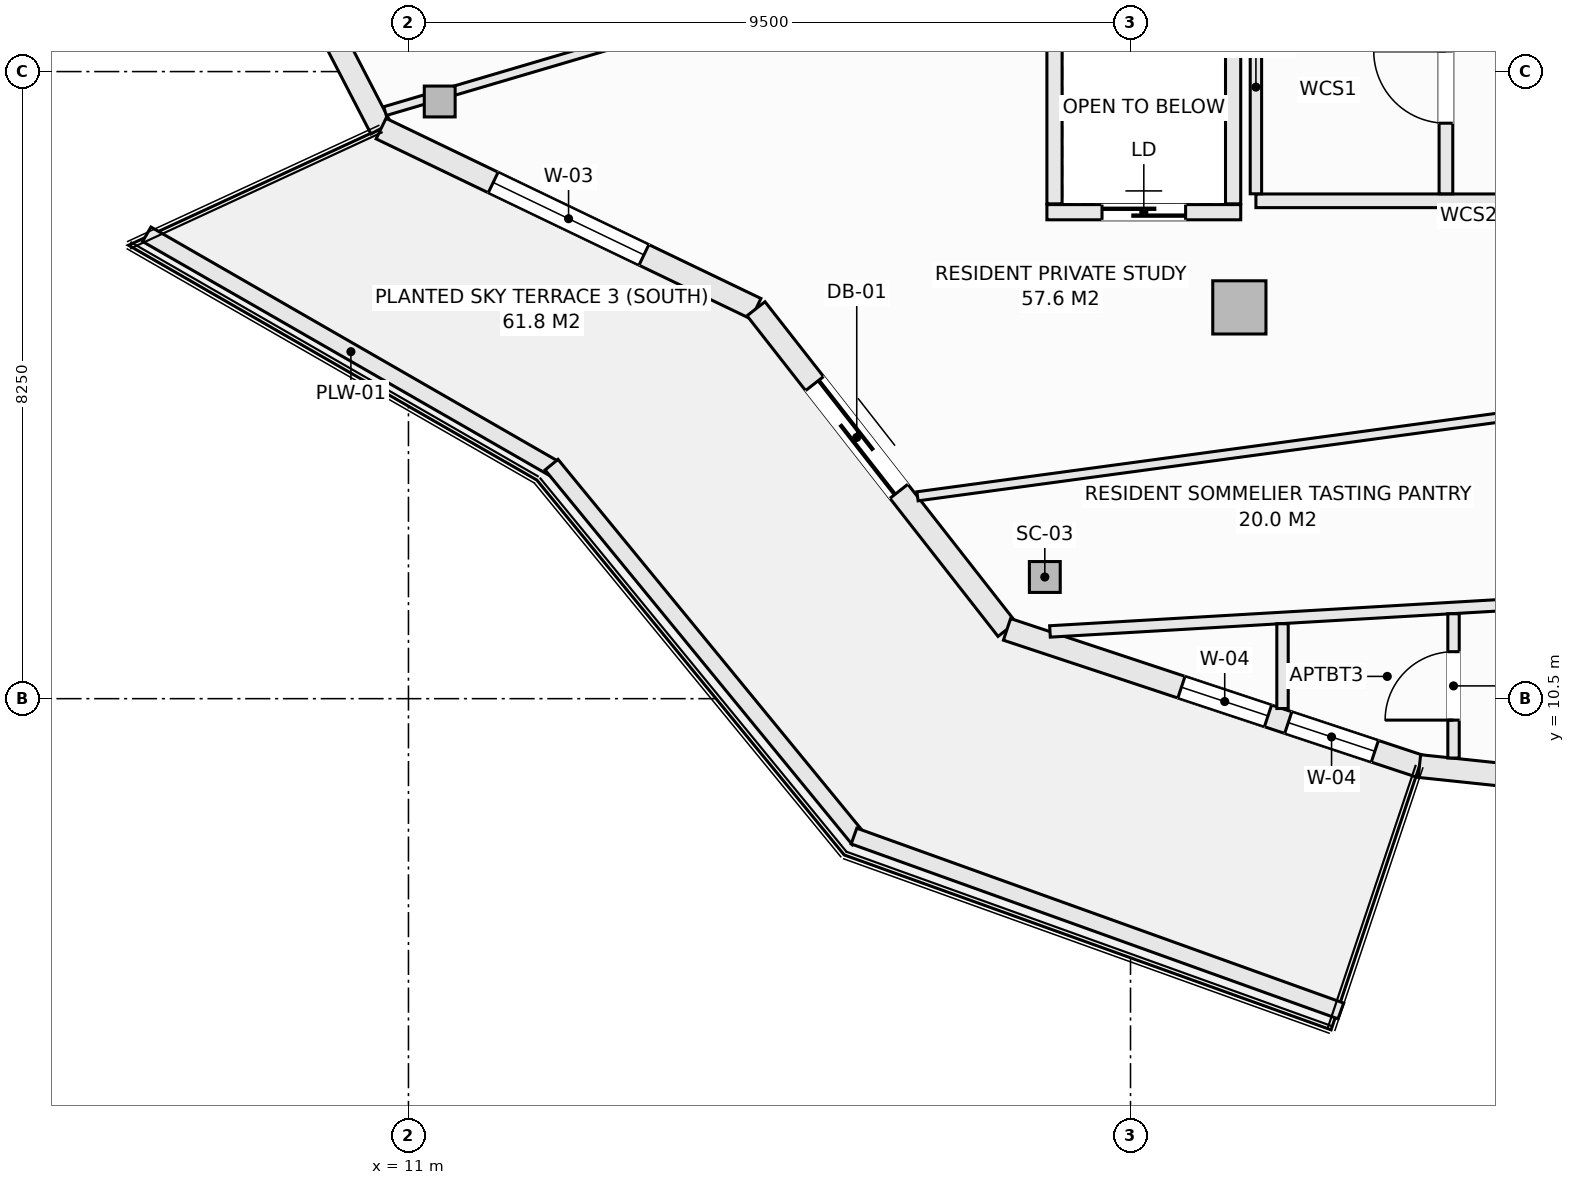
"""IFC4 building model, lengths in metres.
Left out: names, types, materials, properties, quantities, classifications, styles, units other than length and angle.
Written with IfcOpenShell. Run it as: python <this file> out.ifc"""

import sys

from ifc_helpers import new_model, si_unit, direction, frame, frame_2d, origin, origin_2d, place, context, subcontext, project, spatial, rectangle, hollow_rectangle, extrude, element, fill, save


model = new_model("IFC4")
c1 = context("Model", 3, precision=1e-05, world=origin(), true_north=direction((0.0, 1.0)))
c2 = subcontext(c1, "Body", "Model", "MODEL_VIEW")
j1 = project(units=[si_unit("LENGTHUNIT", "METRE"), si_unit("PLANEANGLEUNIT", "RADIAN")], contexts=[c1])
p1 = place(None, origin())
s1 = spatial("IfcSite", under=j1, at=p1, CompositionType="ELEMENT")
p2 = place(p1, origin())
s2 = spatial("IfcBuilding", under=s1, at=p2, CompositionType="ELEMENT")
p3 = place(p2, frame((0.0, 0.0, 242.6)))
s3 = spatial("IfcBuildingStorey", under=s2, at=p3, CompositionType="ELEMENT", Elevation=242.6)
for number, where, z_axis, x_axis in (
    (1, (11.411, 18.356, -0.27), (0.0, 0.0, 1.0), (1.0, 0.0, 0.0)),
    (2, (19.372, 12.101, -0.27), (0.0, 0.0, 1.0), (1.0, 0.0, 0.0)),
):
    element("IfcColumn", number, at=place(p3, frame(where, z_axis=z_axis, x_axis=x_axis)), inside=s3, PredefinedType="COLUMN", context=c2, shape_type="SweptSolid", body=[
        extrude(hollow_rectangle(XDim=0.406, YDim=0.406, WallThickness=0.016, at=origin_2d()), origin(), (0.0, 0.0, 1.0), 3.3),
    ])
p4 = place(p3, frame((21.932, 15.648, -0.27), z_axis=(0.0, 0.0, 1.0), x_axis=(1.0, 0.0, 0.0)))
e3 = element("IfcColumn", 3, at=p4, inside=s3, PredefinedType="COLUMN", context=c2, shape_type="SweptSolid", body=[
    extrude(rectangle(XDim=0.7, YDim=0.7, at=origin_2d()), origin(), (0.0, 0.0, 1.0), 3.3),
])
p5 = place(p3, frame((8.392, 22.341, 0.0), z_axis=(0.0, 0.0, 1.0), x_axis=(0.459793771602, -0.888025724625, 0.0)))
e4 = element("IfcWall", 4, at=p5, inside=s3, PredefinedType="SOLIDWALL", context=c2, shape_type="SweptSolid", body=[
    extrude(rectangle(XDim=4.889, YDim=0.3, at=frame_2d((2.444, 0.0))), origin(), (0.0, 0.0, 1.0), 2.605),
])
p6 = place(p5, frame((1.344, 0.0, 0.72)))
e5 = element("IfcOpeningElement", 5, at=p6, cuts=e4, PredefinedType="OPENING", context=c2, shape_type="SweptSolid", body=[
    extrude(rectangle(XDim=2.2, YDim=1.65, at=frame_2d((1.1, 0.825))), frame((0.0, 0.16, 0.0), z_axis=(0.0, -1.0, 0.0), x_axis=(1.0, 0.0, 0.0)), (0.0, 0.0, 1.0), 0.32),
])
p7 = place(p3, frame((10.639, 18.0, 0.0), z_axis=(0.0, 0.0, 1.0), x_axis=(0.901355238351, -0.433080517106, 0.0)))
e6 = element("IfcWall", 6, at=p7, inside=s3, PredefinedType="SOLIDWALL", context=c2, shape_type="SweptSolid", body=[
    extrude(rectangle(XDim=5.473, YDim=0.3, at=frame_2d((2.737, 0.0))), origin(), (0.0, 0.0, 1.0), 2.605),
])
p8 = place(p7, frame((1.637, 0.0, 0.72)))
e7 = element("IfcOpeningElement", 7, at=p8, cuts=e6, PredefinedType="OPENING", context=c2, shape_type="SweptSolid", body=[
    extrude(rectangle(XDim=2.2, YDim=1.65, at=frame_2d((1.1, 0.825))), frame((0.0, 0.16, 0.0), z_axis=(0.0, -1.0, 0.0), x_axis=(1.0, 0.0, 0.0)), (0.0, 0.0, 1.0), 0.32),
])
p9 = place(p3, frame((15.573, 15.63, 0.0), z_axis=(0.0, 0.0, 1.0), x_axis=(0.61644588519, -0.787397276241, 0.0)))
e8 = element("IfcWall", 8, at=p9, inside=s3, PredefinedType="SOLIDWALL", context=c2, shape_type="SweptSolid", body=[
    extrude(rectangle(XDim=5.357, YDim=0.3, at=frame_2d((2.678, 0.0))), origin(), (0.0, 0.0, 1.0), 2.605),
])
p10 = place(p9, frame((1.25, 0.0, 0.0)))
e9 = element("IfcOpeningElement", 9, at=p10, cuts=e8, PredefinedType="OPENING", context=c2, shape_type="SweptSolid", body=[
    extrude(rectangle(XDim=1.8, YDim=2.25, at=frame_2d((0.9, 1.125))), frame((0.0, 0.16, 0.0), z_axis=(0.0, -1.0, 0.0), x_axis=(1.0, 0.0, 0.0)), (0.0, 0.0, 1.0), 0.32),
])
p11 = place(p3, frame((18.875, 11.412, 0.0), z_axis=(0.0, 0.0, 1.0), x_axis=(0.949232769585, -0.314574552605, 0.0)))
e10 = element("IfcWall", 10, at=p11, inside=s3, PredefinedType="SOLIDWALL", context=c2, shape_type="SweptSolid", body=[
    extrude(rectangle(XDim=5.717, YDim=0.3, at=frame_2d((2.858, 0.0))), origin(), (0.0, 0.0, 1.0), 2.605),
])
p12 = place(p11, frame((2.417, 0.0, 0.72)))
e11 = element("IfcOpeningElement", 11, at=p12, cuts=e10, PredefinedType="OPENING", context=c2, shape_type="SweptSolid", body=[
    extrude(rectangle(XDim=1.2, YDim=1.65, at=frame_2d((0.6, 0.825))), frame((0.0, 0.16, 0.0), z_axis=(0.0, -1.0, 0.0), x_axis=(1.0, 0.0, 0.0)), (0.0, 0.0, 1.0), 0.32),
])
p13 = place(p11, frame((3.898, 0.0, 0.72)))
e12 = element("IfcOpeningElement", 12, at=p13, cuts=e10, PredefinedType="OPENING", context=c2, shape_type="SweptSolid", body=[
    extrude(rectangle(XDim=1.2, YDim=1.65, at=frame_2d((0.6, 0.825))), frame((0.0, 0.16, 0.0), z_axis=(0.0, -1.0, 0.0), x_axis=(1.0, 0.0, 0.0)), (0.0, 0.0, 1.0), 0.32),
])
p14 = place(p3, frame((24.302, 9.613, 0.0), z_axis=(0.0, 0.0, 1.0), x_axis=(0.994500425783, -0.10473253132, 0.0)))
e13 = element("IfcWall", 13, at=p14, inside=s3, PredefinedType="SOLIDWALL", context=c2, shape_type="SweptSolid", body=[
    extrude(rectangle(XDim=5.856, YDim=0.3, at=frame_2d((2.928, 0.0))), origin(), (0.0, 0.0, 1.0), 2.605),
])
p15 = place(p14, frame((1.828, 0.0, 0.72)))
e14 = element("IfcOpeningElement", 14, at=p15, cuts=e13, PredefinedType="OPENING", context=c2, shape_type="SweptSolid", body=[
    extrude(rectangle(XDim=2.2, YDim=1.65, at=frame_2d((1.1, 0.825))), frame((0.0, 0.16, 0.0), z_axis=(0.0, -1.0, 0.0), x_axis=(1.0, 0.0, 0.0)), (0.0, 0.0, 1.0), 0.32),
])
p16 = place(p3, frame((7.557, 16.609, 0.0), z_axis=(0.0, 0.0, 1.0), x_axis=(0.866901621005, -0.49847926687, 0.0)))
e15 = element("IfcWall", 15, at=p16, inside=s3, PredefinedType="PARAPET", context=c2, shape_type="SweptSolid", body=[
    extrude(rectangle(XDim=6.197, YDim=0.22, at=frame_2d((3.098, 0.0))), origin(), (0.0, 0.0, 1.0), 0.52),
])
p17 = place(p3, frame((12.882, 13.579, 0.0), z_axis=(0.0, 0.0, 1.0), x_axis=(0.63407318032, -0.77327304492, 0.0)))
e16 = element("IfcWall", 16, at=p17, inside=s3, PredefinedType="PARAPET", context=c2, shape_type="SweptSolid", body=[
    extrude(rectangle(XDim=6.379, YDim=0.22, at=frame_2d((3.189, 0.0))), origin(), (0.0, 0.0, 1.0), 0.52),
])
p18 = place(p3, frame((16.862, 8.692, 0.0), z_axis=(0.0, 0.0, 1.0), x_axis=(0.941139090914, -0.338019543152, 0.0)))
e17 = element("IfcWall", 17, at=p18, inside=s3, PredefinedType="PARAPET", context=c2, shape_type="SweptSolid", body=[
    extrude(rectangle(XDim=6.807, YDim=0.22, at=frame_2d((3.403, 0.0))), origin(), (0.0, 0.0, 1.0), 0.52),
])
p19 = place(p3, frame((19.4, 16.9, 0.0), z_axis=(0.0, 0.0, 1.0), x_axis=(1.0, 0.0, 0.0)))
e18 = element("IfcWall", 18, at=p19, inside=s3, PredefinedType="SOLIDWALL", context=c2, shape_type="SweptSolid", body=[
    extrude(rectangle(XDim=2.55, YDim=0.2, at=frame_2d((1.275, 0.0))), origin(), (0.0, 0.0, 1.0), 3.03),
])
p20 = place(p19, frame((0.725, 0.0, 0.0)))
e19 = element("IfcOpeningElement", 19, at=p20, cuts=e18, PredefinedType="OPENING", context=c2, shape_type="SweptSolid", body=[
    extrude(rectangle(XDim=1.1, YDim=2.2, at=frame_2d((0.55, 1.1))), frame((0.0, 0.11, 0.0), z_axis=(0.0, -1.0, 0.0), x_axis=(1.0, 0.0, 0.0)), (0.0, 0.0, 1.0), 0.22),
])
for number, where, z_axis, x_axis in (
    (20, (19.5, 17.01, 0.0), (0.0, 0.0, 1.0), (0.0, 1.0, 0.0)),
    (21, (21.85, 17.01, 0.0), (0.0, 0.0, 1.0), (0.0, 1.0, 0.0)),
):
    element("IfcWall", number, at=place(p3, frame(where, z_axis=z_axis, x_axis=x_axis)), inside=s3, PredefinedType="SOLIDWALL", context=c2, shape_type="SweptSolid", body=[
        extrude(rectangle(XDim=2.53, YDim=0.2, at=frame_2d((1.265, 0.0))), origin(), (0.0, 0.0, 1.0), 3.03),
    ])
p21 = place(p3, frame((22.15, 17.05, 0.0), z_axis=(0.0, 0.0, 1.0), x_axis=(1.0, 0.0, 0.0)))
e22 = element("IfcWall", 22, at=p21, inside=s3, PredefinedType="SOLIDWALL", context=c2, shape_type="SweptSolid", body=[
    extrude(rectangle(XDim=5.0, YDim=0.18, at=frame_2d((2.5, 0.0))), origin(), (0.0, 0.0, 1.0), 3.03),
])
p22 = place(p3, frame((22.15, 17.142, 0.0), z_axis=(0.0, 0.0, 1.0), x_axis=(0.0, 1.0, 0.0)))
e23 = element("IfcWall", 23, at=p22, inside=s3, PredefinedType="PARTITIONING", context=c2, shape_type="SweptSolid", body=[
    extrude(rectangle(XDim=2.808, YDim=0.15, at=frame_2d((1.404, 0.0))), origin(), (0.0, 0.0, 1.0), 3.03),
])
p23 = place(p3, frame((24.65, 17.142, 0.0), z_axis=(0.0, 0.0, 1.0), x_axis=(0.0, 1.0, 0.0)))
e24 = element("IfcWall", 24, at=p23, inside=s3, PredefinedType="SOLIDWALL", context=c2, shape_type="SweptSolid", body=[
    extrude(rectangle(XDim=2.808, YDim=0.18, at=frame_2d((1.404, 0.0))), origin(), (0.0, 0.0, 1.0), 3.03),
])
p24 = place(p23, frame((0.929, 0.0, 0.0)))
e25 = element("IfcOpeningElement", 25, at=p24, cuts=e24, PredefinedType="OPENING", context=c2, shape_type="SweptSolid", body=[
    extrude(rectangle(XDim=0.95, YDim=2.1, at=frame_2d((0.475, 1.05))), frame((0.0, 0.1, 0.0), z_axis=(0.0, -1.0, 0.0), x_axis=(1.0, 0.0, 0.0)), (0.0, 0.0, 1.0), 0.2),
])
p25 = place(p3, frame((10.692, 18.23, 0.0), z_axis=(0.0, 0.0, 1.0), x_axis=(0.959163130609, 0.282853475992, 0.0)))
e26 = element("IfcWall", 26, at=p25, inside=s3, PredefinedType="PARTITIONING", context=c2, shape_type="SweptSolid", body=[
    extrude(rectangle(XDim=6.039, YDim=0.12, at=frame_2d((3.02, 0.0))), origin(), (0.0, 0.0, 1.0), 2.77),
])
p26 = place(p3, frame((17.698, 13.162, 0.0), z_axis=(0.0, 0.0, 1.0), x_axis=(0.990958840374, 0.134166227808, 0.0)))
e27 = element("IfcWall", 27, at=p26, inside=s3, PredefinedType="PARTITIONING", context=c2, shape_type="SweptSolid", body=[
    extrude(rectangle(XDim=9.446, YDim=0.12, at=frame_2d((4.723, 0.0))), origin(), (0.0, 0.0, 1.0), 3.03),
])
p27 = place(p3, frame((19.44, 11.384, 0.0), z_axis=(0.0, 0.0, 1.0), x_axis=(0.998303266402, 0.058228758288, 0.0)))
e28 = element("IfcWall", 28, at=p27, inside=s3, PredefinedType="PARTITIONING", context=c2, shape_type="SweptSolid", body=[
    extrude(rectangle(XDim=7.631, YDim=0.15, at=frame_2d((3.815, 0.0))), origin(), (0.0, 0.0, 1.0), 2.605),
])
p28 = place(p3, frame((24.75, 9.719, 0.0), z_axis=(0.0, 0.0, 1.0), x_axis=(0.0, 1.0, 0.0)))
e29 = element("IfcWall", 29, at=p28, inside=s3, PredefinedType="PARTITIONING", context=c2, shape_type="SweptSolid", body=[
    extrude(rectangle(XDim=1.898, YDim=0.15, at=frame_2d((0.949, 0.0))), origin(), (0.0, 0.0, 1.0), 2.77),
])
p29 = place(p28, frame((0.499, 0.0, 0.0)))
e30 = element("IfcOpeningElement", 30, at=p29, cuts=e29, PredefinedType="OPENING", context=c2, shape_type="SweptSolid", body=[
    extrude(rectangle(XDim=0.9, YDim=2.1, at=frame_2d((0.45, 1.05))), frame((0.0, 0.085, 0.0), z_axis=(0.0, -1.0, 0.0), x_axis=(1.0, 0.0, 0.0)), (0.0, 0.0, 1.0), 0.17),
])
p30 = place(p3, frame((22.5, 10.37, 0.0), z_axis=(0.0, 0.0, 1.0), x_axis=(0.0, 1.0, 0.0)))
e31 = element("IfcWall", 31, at=p30, inside=s3, PredefinedType="PARTITIONING", context=c2, shape_type="SweptSolid", body=[
    extrude(rectangle(XDim=1.115, YDim=0.15, at=frame_2d((0.558, 0.0))), origin(), (0.0, 0.0, 1.0), 3.03),
])
p31 = place(p8, origin())
e32 = element("IfcWindow", 32, at=p31, inside=s3, PartitioningType="SINGLE_PANEL", PredefinedType="WINDOW", context=c2, shape_type="SweptSolid", body=[
    extrude(rectangle(XDim=2.2, YDim=1.65, at=frame_2d((1.1, 0.825))), frame((0.0, 0.03, 0.0), z_axis=(0.0, -1.0, 0.0), x_axis=(1.0, 0.0, 0.0)), (0.0, 0.0, 1.0), 0.06),
])
fill(e7, e32)
p32 = place(p10, frame((1.8, 0.0, 0.0), z_axis=(0.0, 0.0, 1.0), x_axis=(-1.0, 0.0, 0.0)))
e33 = element("IfcDoor", 33, at=p32, inside=s3, OperationType="SLIDING_TO_LEFT", PredefinedType="DOOR", context=c2, shape_type="SweptSolid", body=[
    extrude(rectangle(XDim=1.8, YDim=2.25, at=frame_2d((0.9, 1.125))), frame((0.0, 0.025, 0.0), z_axis=(0.0, -1.0, 0.0), x_axis=(1.0, 0.0, 0.0)), (0.0, 0.0, 1.0), 0.05),
])
fill(e9, e33)
p33 = place(p12, origin())
e34 = element("IfcWindow", 34, at=p33, inside=s3, PartitioningType="SINGLE_PANEL", PredefinedType="WINDOW", context=c2, shape_type="SweptSolid", body=[
    extrude(rectangle(XDim=1.2, YDim=1.65, at=frame_2d((0.6, 0.825))), frame((0.0, 0.03, 0.0), z_axis=(0.0, -1.0, 0.0), x_axis=(1.0, 0.0, 0.0)), (0.0, 0.0, 1.0), 0.06),
])
fill(e11, e34)
p34 = place(p20, origin())
e35 = element("IfcDoor", 35, at=p34, inside=s3, OperationType="SLIDING_TO_LEFT", PredefinedType="DOOR", context=c2, shape_type="SweptSolid", body=[
    extrude(rectangle(XDim=1.1, YDim=2.2, at=frame_2d((0.55, 1.1))), frame((0.0, 0.025, 0.0), z_axis=(0.0, -1.0, 0.0), x_axis=(1.0, 0.0, 0.0)), (0.0, 0.0, 1.0), 0.05),
])
fill(e19, e35)
p35 = place(p29, origin())
e36 = element("IfcDoor", 36, at=p35, inside=s3, OperationType="SINGLE_SWING_LEFT", PredefinedType="DOOR", context=c2, shape_type="SweptSolid", body=[
    extrude(rectangle(XDim=0.9, YDim=2.1, at=frame_2d((0.45, 1.05))), frame((0.0, 0.025, 0.0), z_axis=(0.0, -1.0, 0.0), x_axis=(1.0, 0.0, 0.0)), (0.0, 0.0, 1.0), 0.05),
])
fill(e30, e36)
p36 = place(p24, origin())
e37 = element("IfcDoor", 37, at=p36, inside=s3, OperationType="SINGLE_SWING_RIGHT", PredefinedType="DOOR", context=c2, shape_type="SweptSolid", body=[
    extrude(rectangle(XDim=0.95, YDim=2.1, at=frame_2d((0.475, 1.05))), frame((0.0, 0.025, 0.0), z_axis=(0.0, -1.0, 0.0), x_axis=(1.0, 0.0, 0.0)), (0.0, 0.0, 1.0), 0.05),
])
fill(e25, e37)
p37 = place(p13, origin())
e38 = element("IfcWindow", 38, at=p37, inside=s3, PartitioningType="SINGLE_PANEL", PredefinedType="WINDOW", context=c2, shape_type="SweptSolid", body=[
    extrude(rectangle(XDim=1.2, YDim=1.65, at=frame_2d((0.6, 0.825))), frame((0.0, 0.03, 0.0), z_axis=(0.0, -1.0, 0.0), x_axis=(1.0, 0.0, 0.0)), (0.0, 0.0, 1.0), 0.06),
])
fill(e12, e38)
save(model, sys.argv[1])
